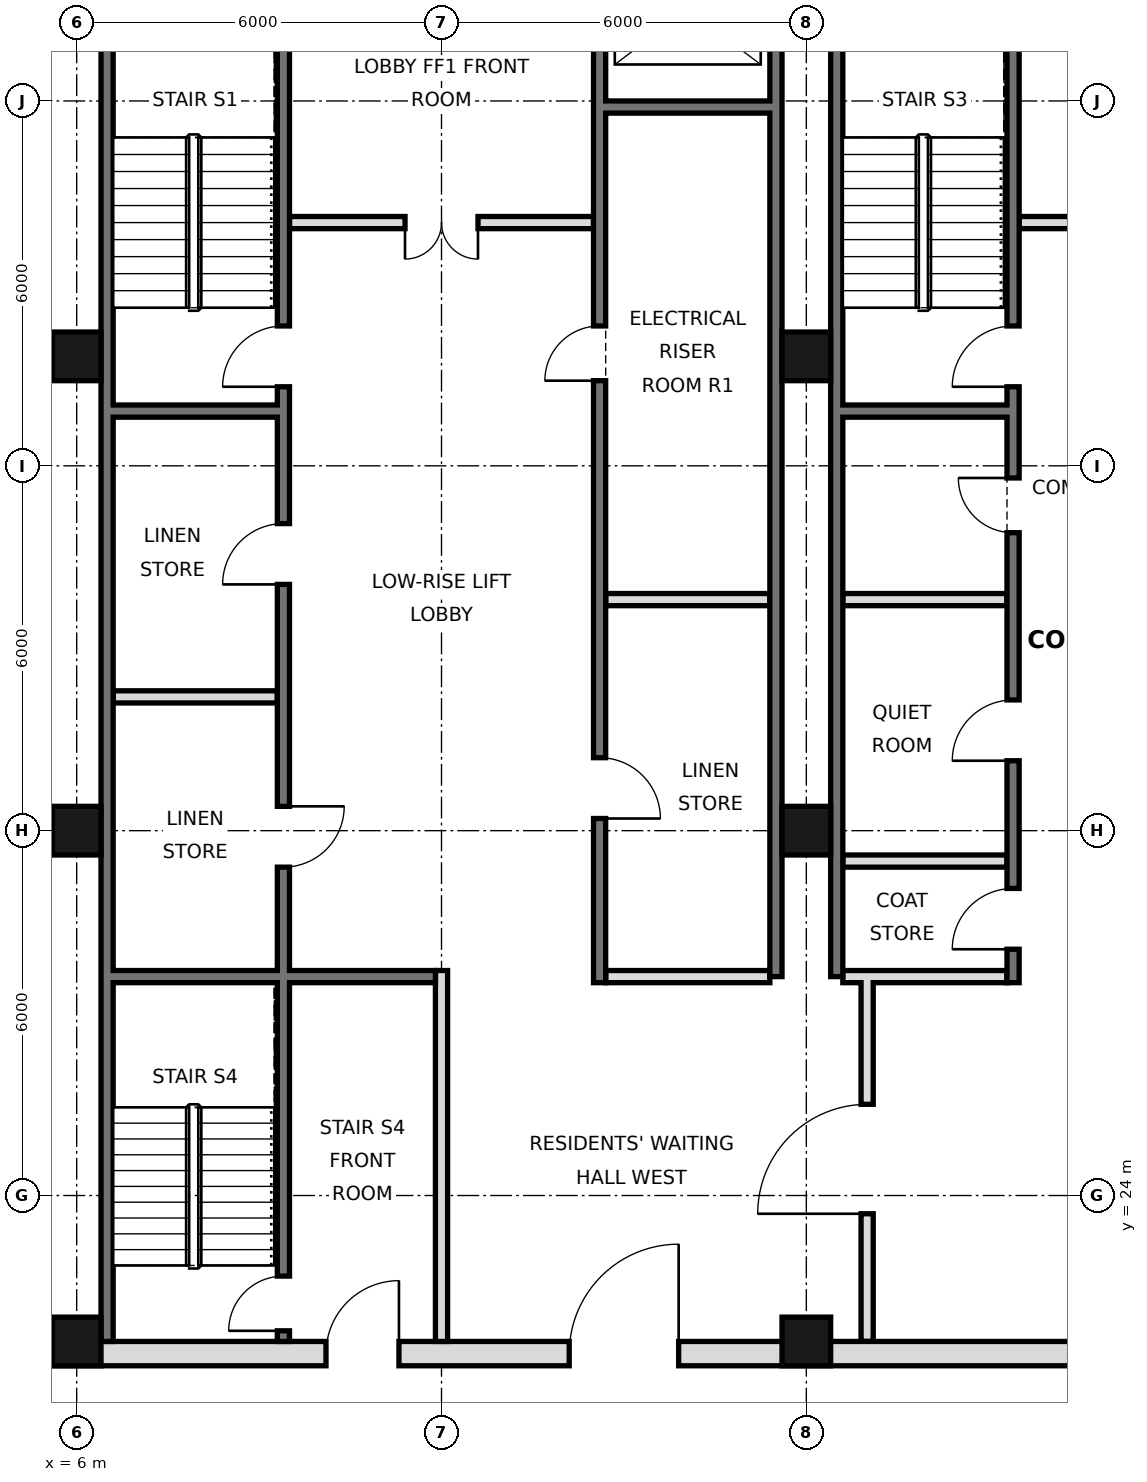
"""IFC4 building model, lengths in metres.
Left out: names, types, materials, properties, quantities, classifications, styles, units other than length and angle.
Written with IfcOpenShell. Run it as: python <this file> out.ifc"""

import sys

from ifc_helpers import new_model, si_unit, direction, frame, frame_2d, origin, origin_2d, place, context, subcontext, project, spatial, rectangle, hollow_rectangle, extrude, element, fill, save


model = new_model("IFC4")
c1 = context("Model", 3, precision=1e-05, world=origin(), true_north=direction((0.0, 1.0)))
c2 = subcontext(c1, "Body", "Model", "MODEL_VIEW")
j1 = project(units=[si_unit("LENGTHUNIT", "METRE"), si_unit("PLANEANGLEUNIT", "RADIAN")], contexts=[c1])
p1 = place(None, origin())
s1 = spatial("IfcSite", under=j1, at=p1, CompositionType="ELEMENT")
p2 = place(p1, origin())
s2 = spatial("IfcBuilding", under=s1, at=p2, CompositionType="ELEMENT")
p3 = place(p2, frame((0.0, 0.0, 273.8)))
s3 = spatial("IfcBuildingStorey", under=s2, at=p3, CompositionType="ELEMENT", Elevation=273.8)
for number, where, z_axis, x_axis in (
    (1, (6.0, 21.6, 0.0), (0.0, 0.0, 1.0), (1.0, 0.0, 0.0)),
    (2, (6.0, 30.0, 0.0), (0.0, 0.0, 1.0), (1.0, 0.0, 0.0)),
    (3, (6.0, 37.8, 0.0), (0.0, 0.0, 1.0), (1.0, 0.0, 0.0)),
    (4, (18.0, 21.6, 0.0), (0.0, 0.0, 1.0), (1.0, 0.0, 0.0)),
    (5, (18.0, 30.0, 0.0), (0.0, 0.0, 1.0), (1.0, 0.0, 0.0)),
    (6, (18.0, 37.8, 0.0), (0.0, 0.0, 1.0), (1.0, 0.0, 0.0)),
):
    element("IfcColumn", number, at=place(p3, frame(where, z_axis=z_axis, x_axis=x_axis)), inside=s3, PredefinedType="COLUMN", context=c2, shape_type="SweptSolid", body=[
        extrude(hollow_rectangle(XDim=0.8, YDim=0.8, WallThickness=0.032, at=origin_2d()), origin(), (0.0, 0.0, 1.0), 3.6),
    ])
p4 = place(p3, frame((6.5, 21.6, 0.0), z_axis=(0.0, 0.0, 1.0), x_axis=(0.0, 1.0, 0.0)))
e7 = element("IfcWall", 7, at=p4, inside=s3, PredefinedType="SOLIDWALL", context=c2, shape_type="SweptSolid", body=[
    extrude(rectangle(XDim=23.5, YDim=0.2, at=frame_2d((11.75, 0.0))), origin(), (0.0, 0.0, 1.0), 3.42),
])
for number, where, z_axis, x_axis in (
    (8, (17.5, 27.6, 0.0), (0.0, 0.0, 1.0), (0.0, 1.0, 0.0)),
    (9, (18.5, 27.6, 0.0), (0.0, 0.0, 1.0), (0.0, 1.0, 0.0)),
):
    element("IfcWall", number, at=place(p3, frame(where, z_axis=z_axis, x_axis=x_axis)), inside=s3, PredefinedType="SOLIDWALL", context=c2, shape_type="SweptSolid", body=[
        extrude(rectangle(XDim=17.5, YDim=0.2, at=frame_2d((8.75, 0.0))), origin(), (0.0, 0.0, 1.0), 3.42),
    ])
p5 = place(p3, frame((5.6, 21.4, 0.0), z_axis=(0.0, 0.0, 1.0), x_axis=(1.0, 0.0, 0.0)))
e10 = element("IfcWall", 10, at=p5, inside=s3, PredefinedType="SOLIDWALL", context=c2, shape_type="SweptSolid", body=[
    extrude(rectangle(XDim=36.8, YDim=0.4, at=frame_2d((18.4, 0.0))), origin(), (0.0, 0.0, 1.0), 3.42),
])
p6 = place(p5, frame((8.5, 0.0, 0.0)))
e11 = element("IfcOpeningElement", 11, at=p6, cuts=e10, PredefinedType="OPENING", context=c2, shape_type="SweptSolid", body=[
    extrude(rectangle(XDim=1.8, YDim=2.1, at=frame_2d((0.9, 1.05))), frame((0.0, 0.21, 0.0), z_axis=(0.0, -1.0, 0.0), x_axis=(1.0, 0.0, 0.0)), (0.0, 0.0, 1.0), 0.42),
])
p7 = place(p5, frame((17.5, 0.0, 0.0)))
e12 = element("IfcOpeningElement", 12, at=p7, cuts=e10, PredefinedType="OPENING", context=c2, shape_type="SweptSolid", body=[
    extrude(rectangle(XDim=1.8, YDim=2.1, at=frame_2d((0.9, 1.05))), frame((0.0, 0.21, 0.0), z_axis=(0.0, -1.0, 0.0), x_axis=(1.0, 0.0, 0.0)), (0.0, 0.0, 1.0), 0.42),
])
p8 = place(p5, frame((26.5, 0.0, 0.0)))
e13 = element("IfcOpeningElement", 13, at=p8, cuts=e10, PredefinedType="OPENING", context=c2, shape_type="SweptSolid", body=[
    extrude(rectangle(XDim=1.8, YDim=2.1, at=frame_2d((0.9, 1.05))), frame((0.0, 0.21, 0.0), z_axis=(0.0, -1.0, 0.0), x_axis=(1.0, 0.0, 0.0)), (0.0, 0.0, 1.0), 0.42),
])
p9 = place(p5, frame((4.5, 0.0, 0.0)))
e14 = element("IfcOpeningElement", 14, at=p9, cuts=e10, PredefinedType="OPENING", context=c2, shape_type="SweptSolid", body=[
    extrude(rectangle(XDim=1.2, YDim=2.1, at=frame_2d((0.6, 1.05))), frame((0.0, 0.21, 0.0), z_axis=(0.0, -1.0, 0.0), x_axis=(1.0, 0.0, 0.0)), (0.0, 0.0, 1.0), 0.42),
])
p10 = place(p5, frame((31.1, 0.0, 0.0)))
e15 = element("IfcOpeningElement", 15, at=p10, cuts=e10, PredefinedType="OPENING", context=c2, shape_type="SweptSolid", body=[
    extrude(rectangle(XDim=1.2, YDim=2.1, at=frame_2d((0.6, 1.05))), frame((0.0, 0.21, 0.0), z_axis=(0.0, -1.0, 0.0), x_axis=(1.0, 0.0, 0.0)), (0.0, 0.0, 1.0), 0.42),
])
p11 = place(p3, frame((19.0, 21.6, 0.0), z_axis=(0.0, 0.0, 1.0), x_axis=(0.0, 1.0, 0.0)))
e16 = element("IfcWall", 16, at=p11, inside=s3, PredefinedType="PARTITIONING", context=c2, shape_type="SweptSolid", body=[
    extrude(rectangle(XDim=6.0, YDim=0.2, at=frame_2d((3.0, 0.0))), origin(), (0.0, 0.0, 1.0), 3.42),
])
p12 = place(p11, frame((2.1, 0.0, 0.0)))
e17 = element("IfcOpeningElement", 17, at=p12, cuts=e16, PredefinedType="OPENING", context=c2, shape_type="SweptSolid", body=[
    extrude(rectangle(XDim=1.8, YDim=2.1, at=frame_2d((0.9, 1.05))), frame((0.0, 0.11, 0.0), z_axis=(0.0, -1.0, 0.0), x_axis=(1.0, 0.0, 0.0)), (0.0, 0.0, 1.0), 0.22),
])
p13 = place(p3, frame((12.0, 21.6, 0.0), z_axis=(0.0, 0.0, 1.0), x_axis=(0.0, 1.0, 0.0)))
e18 = element("IfcWall", 18, at=p13, inside=s3, PredefinedType="PARTITIONING", context=c2, shape_type="SweptSolid", body=[
    extrude(rectangle(XDim=6.1, YDim=0.2, at=frame_2d((3.05, 0.0))), origin(), (0.0, 0.0, 1.0), 3.42),
])
p14 = place(p3, frame((14.6, 27.5, 0.0), z_axis=(0.0, 0.0, 1.0), x_axis=(0.0, 1.0, 0.0)))
e19 = element("IfcWall", 19, at=p14, inside=s3, PredefinedType="SOLIDWALL", context=c2, shape_type="SweptSolid", body=[
    extrude(rectangle(XDim=17.5, YDim=0.2, at=frame_2d((8.75, 0.0))), origin(), (0.0, 0.0, 1.0), 3.42),
])
p15 = place(p14, frame((15.4, 0.0, 0.0)))
e20 = element("IfcOpeningElement", 20, at=p15, cuts=e19, PredefinedType="OPENING", context=c2, shape_type="SweptSolid", body=[
    extrude(rectangle(XDim=1.1, YDim=2.1, at=frame_2d((0.55, 1.05))), frame((0.0, 0.11, 0.0), z_axis=(0.0, -1.0, 0.0), x_axis=(1.0, 0.0, 0.0)), (0.0, 0.0, 1.0), 0.22),
])
p16 = place(p14, frame((2.7, 0.0, 0.0)))
e21 = element("IfcOpeningElement", 21, at=p16, cuts=e19, PredefinedType="OPENING", context=c2, shape_type="SweptSolid", body=[
    extrude(rectangle(XDim=1.0, YDim=2.1, at=frame_2d((0.5, 1.05))), frame((0.0, 0.11, 0.0), z_axis=(0.0, -1.0, 0.0), x_axis=(1.0, 0.0, 0.0)), (0.0, 0.0, 1.0), 0.22),
])
p17 = place(p14, frame((9.9, 0.0, 0.0)))
e22 = element("IfcOpeningElement", 22, at=p17, cuts=e19, PredefinedType="OPENING", context=c2, shape_type="SweptSolid", body=[
    extrude(rectangle(XDim=0.9, YDim=2.1, at=frame_2d((0.45, 1.05))), frame((0.0, 0.11, 0.0), z_axis=(0.0, -1.0, 0.0), x_axis=(1.0, 0.0, 0.0)), (0.0, 0.0, 1.0), 0.22),
])
p18 = place(p3, frame((21.4, 27.5, 0.0), z_axis=(0.0, 0.0, 1.0), x_axis=(0.0, 1.0, 0.0)))
e23 = element("IfcWall", 23, at=p18, inside=s3, PredefinedType="SOLIDWALL", context=c2, shape_type="SweptSolid", body=[
    extrude(rectangle(XDim=17.5, YDim=0.2, at=frame_2d((8.75, 0.0))), origin(), (0.0, 0.0, 1.0), 3.42),
])
p19 = place(p18, frame((0.55, 0.0, 0.0)))
e24 = element("IfcOpeningElement", 24, at=p19, cuts=e23, PredefinedType="OPENING", context=c2, shape_type="SweptSolid", body=[
    extrude(rectangle(XDim=1.0, YDim=2.1, at=frame_2d((0.5, 1.05))), frame((0.0, 0.11, 0.0), z_axis=(0.0, -1.0, 0.0), x_axis=(1.0, 0.0, 0.0)), (0.0, 0.0, 1.0), 0.22),
])
p20 = place(p18, frame((3.65, 0.0, 0.0)))
e25 = element("IfcOpeningElement", 25, at=p20, cuts=e23, PredefinedType="OPENING", context=c2, shape_type="SweptSolid", body=[
    extrude(rectangle(XDim=1.0, YDim=2.1, at=frame_2d((0.5, 1.05))), frame((0.0, 0.11, 0.0), z_axis=(0.0, -1.0, 0.0), x_axis=(1.0, 0.0, 0.0)), (0.0, 0.0, 1.0), 0.22),
])
p21 = place(p18, frame((9.8, 0.0, 0.0)))
e26 = element("IfcOpeningElement", 26, at=p21, cuts=e23, PredefinedType="OPENING", context=c2, shape_type="SweptSolid", body=[
    extrude(rectangle(XDim=1.0, YDim=2.1, at=frame_2d((0.5, 1.05))), frame((0.0, 0.11, 0.0), z_axis=(0.0, -1.0, 0.0), x_axis=(1.0, 0.0, 0.0)), (0.0, 0.0, 1.0), 0.22),
])
p22 = place(p18, frame((7.4, 0.0, 0.0)))
e27 = element("IfcOpeningElement", 27, at=p22, cuts=e23, PredefinedType="OPENING", context=c2, shape_type="SweptSolid", body=[
    extrude(rectangle(XDim=0.9, YDim=2.1, at=frame_2d((0.45, 1.05))), frame((0.0, 0.11, 0.0), z_axis=(0.0, -1.0, 0.0), x_axis=(1.0, 0.0, 0.0)), (0.0, 0.0, 1.0), 0.22),
])
p23 = place(p3, frame((9.4, 21.6, 0.0), z_axis=(0.0, 0.0, 1.0), x_axis=(0.0, 1.0, 0.0)))
e28 = element("IfcWall", 28, at=p23, inside=s3, PredefinedType="SOLIDWALL", context=c2, shape_type="SweptSolid", body=[
    extrude(rectangle(XDim=23.4, YDim=0.2, at=frame_2d((11.7, 0.0))), origin(), (0.0, 0.0, 1.0), 3.42),
])
p24 = place(p23, frame((7.8, 0.0, 0.0)))
e29 = element("IfcOpeningElement", 29, at=p24, cuts=e28, PredefinedType="OPENING", context=c2, shape_type="SweptSolid", body=[
    extrude(rectangle(XDim=1.0, YDim=2.1, at=frame_2d((0.5, 1.05))), frame((0.0, 0.11, 0.0), z_axis=(0.0, -1.0, 0.0), x_axis=(1.0, 0.0, 0.0)), (0.0, 0.0, 1.0), 0.22),
])
p25 = place(p23, frame((12.45, 0.0, 0.0)))
e30 = element("IfcOpeningElement", 30, at=p25, cuts=e28, PredefinedType="OPENING", context=c2, shape_type="SweptSolid", body=[
    extrude(rectangle(XDim=1.0, YDim=2.1, at=frame_2d((0.5, 1.05))), frame((0.0, 0.11, 0.0), z_axis=(0.0, -1.0, 0.0), x_axis=(1.0, 0.0, 0.0)), (0.0, 0.0, 1.0), 0.22),
])
p26 = place(p23, frame((15.7, 0.0, 0.0)))
e31 = element("IfcOpeningElement", 31, at=p26, cuts=e28, PredefinedType="OPENING", context=c2, shape_type="SweptSolid", body=[
    extrude(rectangle(XDim=1.0, YDim=2.1, at=frame_2d((0.5, 1.05))), frame((0.0, 0.11, 0.0), z_axis=(0.0, -1.0, 0.0), x_axis=(1.0, 0.0, 0.0)), (0.0, 0.0, 1.0), 0.22),
])
p27 = place(p23, frame((0.175, 0.0, 0.0)))
e32 = element("IfcOpeningElement", 32, at=p27, cuts=e28, PredefinedType="OPENING", context=c2, shape_type="SweptSolid", body=[
    extrude(rectangle(XDim=0.9, YDim=2.1, at=frame_2d((0.45, 1.05))), frame((0.0, 0.11, 0.0), z_axis=(0.0, -1.0, 0.0), x_axis=(1.0, 0.0, 0.0)), (0.0, 0.0, 1.0), 0.22),
])
for number, where, z_axis, x_axis in (
    (33, (14.7, 27.6, 0.0), (0.0, 0.0, 1.0), (1.0, 0.0, 0.0)),
    (34, (18.6, 27.6, 0.0), (0.0, 0.0, 1.0), (1.0, 0.0, 0.0)),
):
    element("IfcWall", number, at=place(p3, frame(where, z_axis=z_axis, x_axis=x_axis)), inside=s3, PredefinedType="PARTITIONING", context=c2, shape_type="SweptSolid", body=[
        extrude(rectangle(XDim=2.7, YDim=0.2, at=frame_2d((1.35, 0.0))), origin(), (0.0, 0.0, 1.0), 3.42),
    ])
p28 = place(p3, frame((6.6, 27.6, 0.0), z_axis=(0.0, 0.0, 1.0), x_axis=(1.0, 0.0, 0.0)))
e35 = element("IfcWall", 35, at=p28, inside=s3, PredefinedType="SOLIDWALL", context=c2, shape_type="SweptSolid", body=[
    extrude(rectangle(XDim=5.3, YDim=0.2, at=frame_2d((2.65, 0.0))), origin(), (0.0, 0.0, 1.0), 3.42),
])
for number, where, z_axis, x_axis in (
    (36, (18.6, 29.5, 0.0), (0.0, 0.0, 1.0), (1.0, 0.0, 0.0)),
    (37, (6.6, 32.2, 0.0), (0.0, 0.0, 1.0), (1.0, 0.0, 0.0)),
):
    element("IfcWall", number, at=place(p3, frame(where, z_axis=z_axis, x_axis=x_axis)), inside=s3, PredefinedType="PARTITIONING", context=c2, shape_type="SweptSolid", body=[
        extrude(rectangle(XDim=2.7, YDim=0.2, at=frame_2d((1.35, 0.0))), origin(), (0.0, 0.0, 1.0), 3.42),
    ])
for number, where, z_axis, x_axis in (
    (38, (14.7, 33.8, 0.0), (0.0, 0.0, 1.0), (1.0, 0.0, 0.0)),
    (39, (18.6, 33.8, 0.0), (0.0, 0.0, 1.0), (1.0, 0.0, 0.0)),
    (40, (18.6, 36.9, 0.0), (0.0, 0.0, 1.0), (1.0, 0.0, 0.0)),
    (41, (6.6, 36.9, 0.0), (0.0, 0.0, 1.0), (1.0, 0.0, 0.0)),
):
    element("IfcWall", number, at=place(p3, frame(where, z_axis=z_axis, x_axis=x_axis)), inside=s3, PredefinedType="SOLIDWALL", context=c2, shape_type="SweptSolid", body=[
        extrude(rectangle(XDim=2.7, YDim=0.2, at=frame_2d((1.35, 0.0))), origin(), (0.0, 0.0, 1.0), 3.42),
    ])
p29 = place(p3, frame((21.5, 40.0, 0.0), z_axis=(0.0, 0.0, 1.0), x_axis=(1.0, 0.0, 0.0)))
e42 = element("IfcWall", 42, at=p29, inside=s3, PredefinedType="PARTITIONING", context=c2, shape_type="SweptSolid", body=[
    extrude(rectangle(XDim=5.0, YDim=0.2, at=frame_2d((2.5, 0.0))), origin(), (0.0, 0.0, 1.0), 3.42),
])
p30 = place(p29, frame((1.9, 0.0, 0.0)))
e43 = element("IfcOpeningElement", 43, at=p30, cuts=e42, PredefinedType="OPENING", context=c2, shape_type="SweptSolid", body=[
    extrude(rectangle(XDim=1.2, YDim=2.1, at=frame_2d((0.6, 1.05))), frame((0.0, 0.11, 0.0), z_axis=(0.0, -1.0, 0.0), x_axis=(1.0, 0.0, 0.0)), (0.0, 0.0, 1.0), 0.22),
])
p31 = place(p3, frame((9.5, 40.0, 0.0), z_axis=(0.0, 0.0, 1.0), x_axis=(1.0, 0.0, 0.0)))
e44 = element("IfcWall", 44, at=p31, inside=s3, PredefinedType="PARTITIONING", context=c2, shape_type="SweptSolid", body=[
    extrude(rectangle(XDim=5.0, YDim=0.2, at=frame_2d((2.5, 0.0))), origin(), (0.0, 0.0, 1.0), 3.42),
])
p32 = place(p31, frame((1.9, 0.0, 0.0)))
e45 = element("IfcOpeningElement", 45, at=p32, cuts=e44, PredefinedType="OPENING", context=c2, shape_type="SweptSolid", body=[
    extrude(rectangle(XDim=1.2, YDim=2.1, at=frame_2d((0.6, 1.05))), frame((0.0, 0.11, 0.0), z_axis=(0.0, -1.0, 0.0), x_axis=(1.0, 0.0, 0.0)), (0.0, 0.0, 1.0), 0.22),
])
p33 = place(p3, frame((14.7, 41.9, 0.0), z_axis=(0.0, 0.0, 1.0), x_axis=(1.0, 0.0, 0.0)))
e46 = element("IfcWall", 46, at=p33, inside=s3, PredefinedType="SOLIDWALL", context=c2, shape_type="SweptSolid", body=[
    extrude(rectangle(XDim=2.7, YDim=0.2, at=frame_2d((1.35, 0.0))), origin(), (0.0, 0.0, 1.0), 3.42),
])
p34 = place(p6, frame((1.8, 0.0, 0.0), z_axis=(0.0, 0.0, 1.0), x_axis=(-1.0, 0.0, 0.0)))
e47 = element("IfcDoor", 47, at=p34, inside=s3, OperationType="SINGLE_SWING_LEFT", PredefinedType="DOOR", context=c2, shape_type="SweptSolid", body=[
    extrude(rectangle(XDim=1.8, YDim=2.1, at=frame_2d((0.9, 1.05))), frame((0.0, 0.025, 0.0), z_axis=(0.0, -1.0, 0.0), x_axis=(1.0, 0.0, 0.0)), (0.0, 0.0, 1.0), 0.05),
])
fill(e11, e47)
p35 = place(p12, origin())
e48 = element("IfcDoor", 48, at=p35, inside=s3, OperationType="SINGLE_SWING_LEFT", PredefinedType="DOOR", context=c2, shape_type="SweptSolid", body=[
    extrude(rectangle(XDim=1.8, YDim=2.1, at=frame_2d((0.9, 1.05))), frame((0.0, 0.025, 0.0), z_axis=(0.0, -1.0, 0.0), x_axis=(1.0, 0.0, 0.0)), (0.0, 0.0, 1.0), 0.05),
])
fill(e17, e48)
p36 = place(p9, frame((1.2, 0.0, 0.0), z_axis=(0.0, 0.0, 1.0), x_axis=(-1.0, 0.0, 0.0)))
e49 = element("IfcDoor", 49, at=p36, inside=s3, OperationType="SINGLE_SWING_LEFT", PredefinedType="DOOR", context=c2, shape_type="SweptSolid", body=[
    extrude(rectangle(XDim=1.2, YDim=2.1, at=frame_2d((0.6, 1.05))), frame((0.0, 0.025, 0.0), z_axis=(0.0, -1.0, 0.0), x_axis=(1.0, 0.0, 0.0)), (0.0, 0.0, 1.0), 0.05),
])
fill(e14, e49)
p37 = place(p32, frame((1.2, 0.0, 0.0), z_axis=(0.0, 0.0, 1.0), x_axis=(-1.0, 0.0, 0.0)))
e50 = element("IfcDoor", 50, at=p37, inside=s3, OperationType="DOUBLE_DOOR_SINGLE_SWING", PredefinedType="DOOR", context=c2, shape_type="SweptSolid", body=[
    extrude(rectangle(XDim=1.2, YDim=2.1, at=frame_2d((0.6, 1.05))), frame((0.0, 0.025, 0.0), z_axis=(0.0, -1.0, 0.0), x_axis=(1.0, 0.0, 0.0)), (0.0, 0.0, 1.0), 0.05),
])
fill(e45, e50)
p38 = place(p19, origin())
e51 = element("IfcDoor", 51, at=p38, inside=s3, OperationType="SINGLE_SWING_LEFT", PredefinedType="DOOR", context=c2, shape_type="SweptSolid", body=[
    extrude(rectangle(XDim=1.0, YDim=2.1, at=frame_2d((0.5, 1.05))), frame((0.0, 0.025, 0.0), z_axis=(0.0, -1.0, 0.0), x_axis=(1.0, 0.0, 0.0)), (0.0, 0.0, 1.0), 0.05),
])
fill(e24, e51)
p39 = place(p20, origin())
e52 = element("IfcDoor", 52, at=p39, inside=s3, OperationType="SINGLE_SWING_LEFT", PredefinedType="DOOR", context=c2, shape_type="SweptSolid", body=[
    extrude(rectangle(XDim=1.0, YDim=2.1, at=frame_2d((0.5, 1.05))), frame((0.0, 0.025, 0.0), z_axis=(0.0, -1.0, 0.0), x_axis=(1.0, 0.0, 0.0)), (0.0, 0.0, 1.0), 0.05),
])
fill(e25, e52)
p40 = place(p16, frame((1.0, 0.0, 0.0), z_axis=(0.0, 0.0, 1.0), x_axis=(-1.0, 0.0, 0.0)))
e53 = element("IfcDoor", 53, at=p40, inside=s3, OperationType="SINGLE_SWING_RIGHT", PredefinedType="DOOR", context=c2, shape_type="SweptSolid", body=[
    extrude(rectangle(XDim=1.0, YDim=2.1, at=frame_2d((0.5, 1.05))), frame((0.0, 0.025, 0.0), z_axis=(0.0, -1.0, 0.0), x_axis=(1.0, 0.0, 0.0)), (0.0, 0.0, 1.0), 0.05),
])
fill(e21, e53)
p41 = place(p24, origin())
e54 = element("IfcDoor", 54, at=p41, inside=s3, OperationType="SINGLE_SWING_RIGHT", PredefinedType="DOOR", context=c2, shape_type="SweptSolid", body=[
    extrude(rectangle(XDim=1.0, YDim=2.1, at=frame_2d((0.5, 1.05))), frame((0.0, 0.025, 0.0), z_axis=(0.0, -1.0, 0.0), x_axis=(1.0, 0.0, 0.0)), (0.0, 0.0, 1.0), 0.05),
])
fill(e29, e54)
p42 = place(p25, origin())
e55 = element("IfcDoor", 55, at=p42, inside=s3, OperationType="SINGLE_SWING_LEFT", PredefinedType="DOOR", context=c2, shape_type="SweptSolid", body=[
    extrude(rectangle(XDim=1.0, YDim=2.1, at=frame_2d((0.5, 1.05))), frame((0.0, 0.025, 0.0), z_axis=(0.0, -1.0, 0.0), x_axis=(1.0, 0.0, 0.0)), (0.0, 0.0, 1.0), 0.05),
])
fill(e30, e55)
p43 = place(p26, origin())
e56 = element("IfcDoor", 56, at=p43, inside=s3, OperationType="SINGLE_SWING_LEFT", PredefinedType="DOOR", context=c2, shape_type="SweptSolid", body=[
    extrude(rectangle(XDim=1.0, YDim=2.1, at=frame_2d((0.5, 1.05))), frame((0.0, 0.025, 0.0), z_axis=(0.0, -1.0, 0.0), x_axis=(1.0, 0.0, 0.0)), (0.0, 0.0, 1.0), 0.05),
])
fill(e31, e56)
p44 = place(p21, origin())
e57 = element("IfcDoor", 57, at=p44, inside=s3, OperationType="SINGLE_SWING_LEFT", PredefinedType="DOOR", context=c2, shape_type="SweptSolid", body=[
    extrude(rectangle(XDim=1.0, YDim=2.1, at=frame_2d((0.5, 1.05))), frame((0.0, 0.025, 0.0), z_axis=(0.0, -1.0, 0.0), x_axis=(1.0, 0.0, 0.0)), (0.0, 0.0, 1.0), 0.05),
])
fill(e26, e57)
p45 = place(p27, origin())
e58 = element("IfcDoor", 58, at=p45, inside=s3, OperationType="SINGLE_SWING_LEFT", PredefinedType="DOOR", context=c2, shape_type="SweptSolid", body=[
    extrude(rectangle(XDim=0.9, YDim=2.1, at=frame_2d((0.45, 1.05))), frame((0.0, 0.025, 0.0), z_axis=(0.0, -1.0, 0.0), x_axis=(1.0, 0.0, 0.0)), (0.0, 0.0, 1.0), 0.05),
])
fill(e32, e58)
p46 = place(p17, origin())
e59 = element("IfcDoor", 59, at=p46, inside=s3, OperationType="SINGLE_SWING_LEFT", PredefinedType="DOOR", context=c2, shape_type="SweptSolid", body=[
    extrude(rectangle(XDim=0.9, YDim=2.1, at=frame_2d((0.45, 1.05))), frame((0.0, 0.025, 0.0), z_axis=(0.0, -1.0, 0.0), x_axis=(1.0, 0.0, 0.0)), (0.0, 0.0, 1.0), 0.05),
])
fill(e22, e59)
p47 = place(p22, frame((0.9, 0.0, 0.0), z_axis=(0.0, 0.0, 1.0), x_axis=(-1.0, 0.0, 0.0)))
e60 = element("IfcDoor", 60, at=p47, inside=s3, OperationType="SINGLE_SWING_LEFT", PredefinedType="DOOR", context=c2, shape_type="SweptSolid", body=[
    extrude(rectangle(XDim=0.9, YDim=2.1, at=frame_2d((0.45, 1.05))), frame((0.0, 0.025, 0.0), z_axis=(0.0, -1.0, 0.0), x_axis=(1.0, 0.0, 0.0)), (0.0, 0.0, 1.0), 0.05),
])
fill(e27, e60)
save(model, sys.argv[1])
